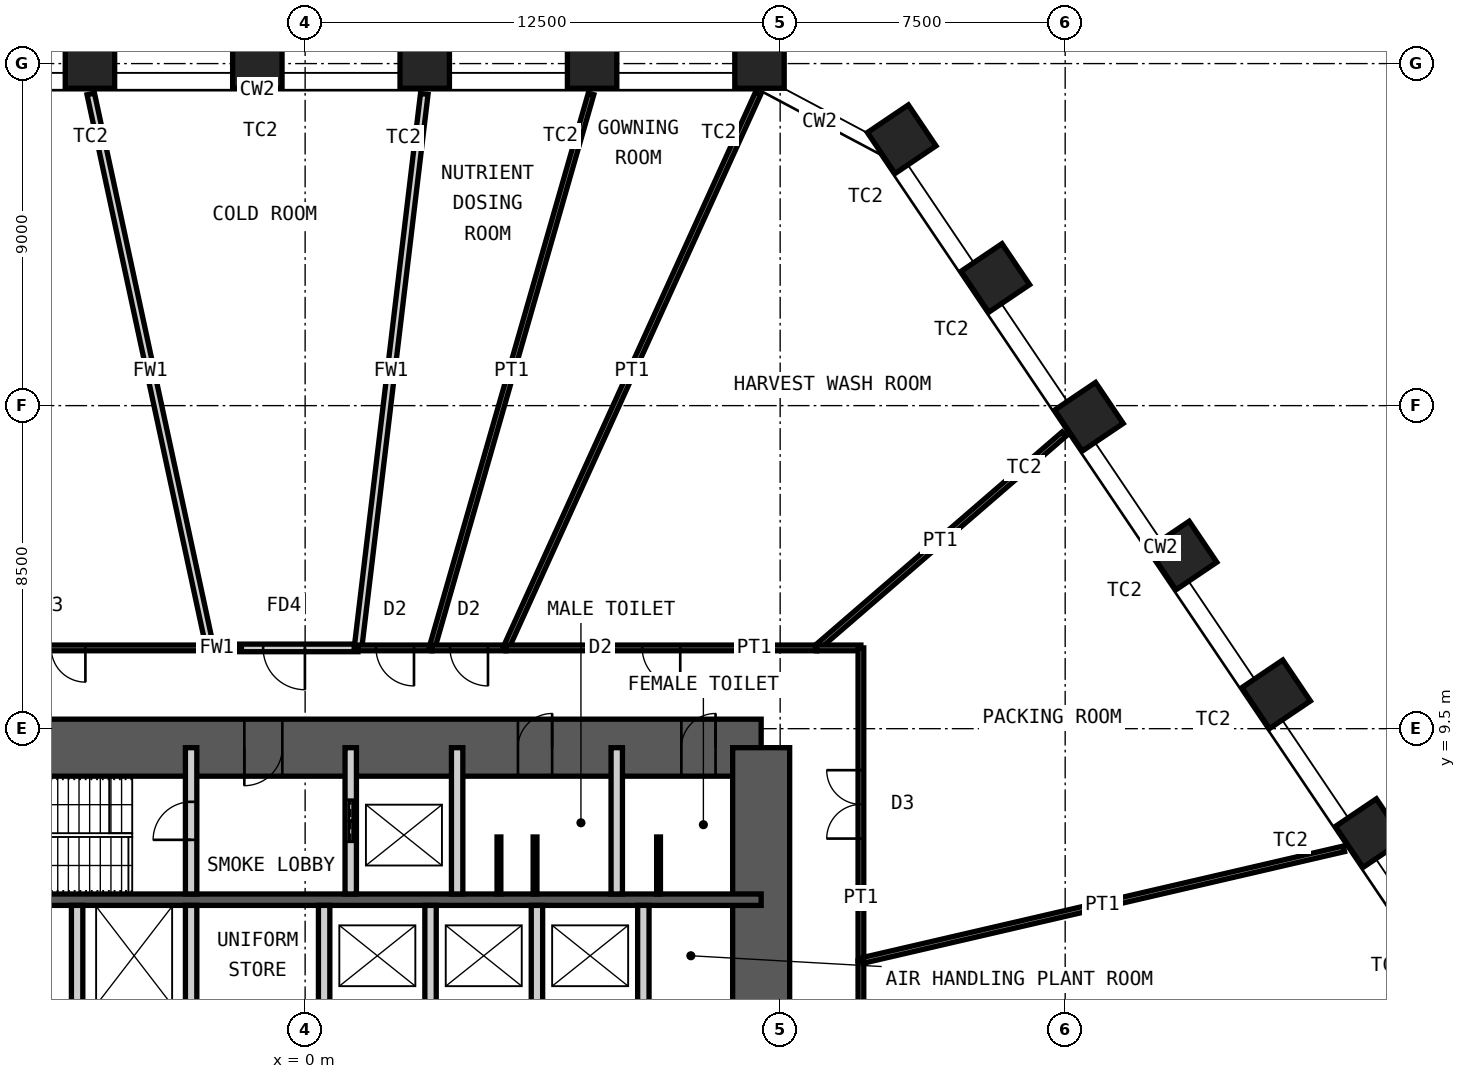
"""IFC4 building model, lengths in metres.
Left out: names, types, materials, properties, quantities, classifications, styles, units other than length and angle.
Written with IfcOpenShell. Run it as: python <this file> out.ifc"""

import sys

from ifc_helpers import new_model, si_unit, direction, frame, frame_2d, origin, origin_2d, place, context, subcontext, project, spatial, rectangle, hollow_rectangle, extrude, element, fill, save


model = new_model("IFC4")
c1 = context("Model", 3, precision=1e-05, world=origin(), true_north=direction((0.0, 1.0)))
c2 = subcontext(c1, "Body", "Model", "MODEL_VIEW")
j1 = project(units=[si_unit("LENGTHUNIT", "METRE"), si_unit("PLANEANGLEUNIT", "RADIAN")], contexts=[c1])
p1 = place(None, origin())
s1 = spatial("IfcSite", under=j1, at=p1, CompositionType="ELEMENT")
p2 = place(p1, origin())
s2 = spatial("IfcBuilding", under=s1, at=p2, CompositionType="ELEMENT")
p3 = place(p2, frame((0.0, 0.0, 72.0)))
s3 = spatial("IfcBuildingStorey", under=s2, at=p3, CompositionType="ELEMENT", Elevation=72.0)
for number, where, z_axis, x_axis in (
    (1, (-5.662, 27.0, 0.0), (0.0, 0.0, 1.0), (-1.0, 0.0, 0.0)),
    (2, (-1.258, 27.0, 0.0), (0.0, 0.0, 1.0), (-1.0, 0.0, 0.0)),
    (3, (3.147, 27.0, 0.0), (0.0, 0.0, 1.0), (-1.0, 0.0, 0.0)),
    (4, (7.552, 27.0, 0.0), (0.0, 0.0, 1.0), (-1.0, 0.0, 0.0)),
    (5, (11.956, 27.0, 0.0), (0.0, 0.0, 1.0), (-1.0, 0.0, 0.0)),
    (6, (15.698, 25.01, 0.0), (0.0, 0.0, 1.0), (-0.559, 0.829, 0.0)),
    (7, (18.161, 21.359, 0.0), (0.0, 0.0, 1.0), (-0.559, 0.829, 0.0)),
    (8, (20.624, 17.707, 0.0), (0.0, 0.0, 1.0), (-0.559, 0.829, 0.0)),
    (9, (23.087, 14.056, 0.0), (0.0, 0.0, 1.0), (-0.559, 0.829, 0.0)),
    (10, (25.55, 10.404, 0.0), (0.0, 0.0, 1.0), (-0.559, 0.829, 0.0)),
    (11, (28.013, 6.752, 0.0), (0.0, 0.0, 1.0), (-0.559, 0.829, 0.0)),
):
    element("IfcColumn", number, at=place(p3, frame(where, z_axis=z_axis, x_axis=x_axis)), inside=s3, PredefinedType="COLUMN", context=c2, shape_type="SweptSolid", body=[
        extrude(hollow_rectangle(XDim=1.3, YDim=1.3, WallThickness=0.1, at=origin_2d()), origin(), (0.0, 0.0, 1.0), 5.0),
    ])
p4 = place(p3, frame((-12.0, 9.0, 0.0), z_axis=(0.0, 0.0, 1.0), x_axis=(1.0, 0.0, 0.0)))
e12 = element("IfcWall", 12, at=p4, inside=s3, PredefinedType="SHEAR", context=c2, shape_type="SweptSolid", body=[
    extrude(rectangle(XDim=24.0, YDim=1.5, at=frame_2d((12.0, 0.0))), origin(), (0.0, 0.0, 1.0), 5.0),
])
p5 = place(p4, frame((10.4, 0.0, 0.0)))
e13 = element("IfcOpeningElement", 13, at=p5, cuts=e12, PredefinedType="OPENING", context=c2, shape_type="SweptSolid", body=[
    extrude(rectangle(XDim=1.0, YDim=2.1, at=frame_2d((0.5, 1.05))), frame((0.0, 0.76, 0.0), z_axis=(0.0, -1.0, 0.0), x_axis=(1.0, 0.0, 0.0)), (0.0, 0.0, 1.0), 1.52),
])
p6 = place(p4, frame((17.6, 0.0, 0.0)))
e14 = element("IfcOpeningElement", 14, at=p6, cuts=e12, PredefinedType="OPENING", context=c2, shape_type="SweptSolid", body=[
    extrude(rectangle(XDim=0.9, YDim=2.1, at=frame_2d((0.45, 1.05))), frame((0.0, 0.76, 0.0), z_axis=(0.0, -1.0, 0.0), x_axis=(1.0, 0.0, 0.0)), (0.0, 0.0, 1.0), 1.52),
])
p7 = place(p4, frame((21.9, 0.0, 0.0)))
e15 = element("IfcOpeningElement", 15, at=p7, cuts=e12, PredefinedType="OPENING", context=c2, shape_type="SweptSolid", body=[
    extrude(rectangle(XDim=0.9, YDim=2.1, at=frame_2d((0.45, 1.05))), frame((0.0, 0.76, 0.0), z_axis=(0.0, -1.0, 0.0), x_axis=(1.0, 0.0, 0.0)), (0.0, 0.0, 1.0), 1.52),
])
p8 = place(p3, frame((12.0, -9.0, 0.0), z_axis=(0.0, 0.0, 1.0), x_axis=(0.0, 1.0, 0.0)))
e16 = element("IfcWall", 16, at=p8, inside=s3, PredefinedType="SHEAR", context=c2, shape_type="SweptSolid", body=[
    extrude(rectangle(XDim=18.0, YDim=1.5, at=frame_2d((9.0, 0.0))), origin(), (0.0, 0.0, 1.0), 5.0),
])
p9 = place(p8, frame((8.1, 0.0, 0.0)))
e17 = element("IfcOpeningElement", 17, at=p9, cuts=e16, PredefinedType="OPENING", context=c2, shape_type="SweptSolid", body=[
    extrude(rectangle(XDim=1.8, YDim=2.1, at=frame_2d((0.9, 1.05))), frame((0.0, 0.76, 0.0), z_axis=(0.0, -1.0, 0.0), x_axis=(1.0, 0.0, 0.0)), (0.0, 0.0, 1.0), 1.52),
])
p10 = place(p3, frame((-12.0, 5.0, 0.0), z_axis=(0.0, 0.0, 1.0), x_axis=(1.0, 0.0, 0.0)))
e18 = element("IfcWall", 18, at=p10, inside=s3, PredefinedType="SHEAR", context=c2, shape_type="SweptSolid", body=[
    extrude(rectangle(XDim=24.0, YDim=0.3, at=frame_2d((12.0, 0.0))), origin(), (0.0, 0.0, 1.0), 5.0),
])
p11 = place(p3, frame((-3.0, 5.15, 0.0), z_axis=(0.0, 0.0, 1.0), x_axis=(0.0, 1.0, 0.0)))
e19 = element("IfcWall", 19, at=p11, inside=s3, PredefinedType="PARTITIONING", context=c2, shape_type="SweptSolid", body=[
    extrude(rectangle(XDim=3.85, YDim=0.3, at=frame_2d((1.925, 0.0))), origin(), (0.0, 0.0, 1.0), 4.78),
])
p12 = place(p11, frame((1.425, 0.0, 0.0)))
e20 = element("IfcOpeningElement", 20, at=p12, cuts=e19, PredefinedType="OPENING", context=c2, shape_type="SweptSolid", body=[
    extrude(rectangle(XDim=1.0, YDim=2.1, at=frame_2d((0.5, 1.05))), frame((0.0, 0.16, 0.0), z_axis=(0.0, -1.0, 0.0), x_axis=(1.0, 0.0, 0.0)), (0.0, 0.0, 1.0), 0.32),
])
p13 = place(p3, frame((1.2, 5.15, 0.0), z_axis=(0.0, 0.0, 1.0), x_axis=(0.0, 1.0, 0.0)))
e21 = element("IfcWall", 21, at=p13, inside=s3, PredefinedType="PARTITIONING", context=c2, shape_type="SweptSolid", body=[
    extrude(rectangle(XDim=3.85, YDim=0.3, at=frame_2d((1.925, 0.0))), origin(), (0.0, 0.0, 1.0), 4.78),
])
p14 = place(p13, frame((1.375, 0.0, 0.0)))
e22 = element("IfcOpeningElement", 22, at=p14, cuts=e21, PredefinedType="OPENING", context=c2, shape_type="SweptSolid", body=[
    extrude(rectangle(XDim=1.1, YDim=2.4, at=frame_2d((0.55, 1.2))), frame((0.0, 0.16, 0.0), z_axis=(0.0, -1.0, 0.0), x_axis=(1.0, 0.0, 0.0)), (0.0, 0.0, 1.0), 0.32),
])
for number, where, z_axis, x_axis in (
    (23, (4.0, 5.15, 0.0), (0.0, 0.0, 1.0), (0.0, 1.0, 0.0)),
    (24, (8.2, 5.15, 0.0), (0.0, 0.0, 1.0), (0.0, 1.0, 0.0)),
):
    element("IfcWall", number, at=place(p3, frame(where, z_axis=z_axis, x_axis=x_axis)), inside=s3, PredefinedType="PARTITIONING", context=c2, shape_type="SweptSolid", body=[
        extrude(rectangle(XDim=3.85, YDim=0.3, at=frame_2d((1.925, 0.0))), origin(), (0.0, 0.0, 1.0), 4.78),
    ])
for number, where, z_axis, x_axis in (
    (25, (-6.0, 2.2, 0.0), (0.0, 0.0, 1.0), (0.0, 1.0, 0.0)),
    (26, (-3.0, 2.2, 0.0), (0.0, 0.0, 1.0), (0.0, 1.0, 0.0)),
    (27, (0.5, 2.2, 0.0), (0.0, 0.0, 1.0), (0.0, 1.0, 0.0)),
    (28, (3.3, 2.2, 0.0), (0.0, 0.0, 1.0), (0.0, 1.0, 0.0)),
    (29, (6.1, 2.2, 0.0), (0.0, 0.0, 1.0), (0.0, 1.0, 0.0)),
    (30, (8.9, 2.2, 0.0), (0.0, 0.0, 1.0), (0.0, 1.0, 0.0)),
):
    element("IfcWall", number, at=place(p3, frame(where, z_axis=z_axis, x_axis=x_axis)), inside=s3, PredefinedType="PARTITIONING", context=c2, shape_type="SweptSolid", body=[
        extrude(rectangle(XDim=2.65, YDim=0.3, at=frame_2d((1.325, 0.0))), origin(), (0.0, 0.0, 1.0), 4.78),
    ])
for number, where, z_axis, x_axis in (
    (31, (5.1, 5.15, 0.0), (0.0, 0.0, 1.0), (0.0, 1.0, 0.0)),
    (32, (6.05, 5.15, 0.0), (0.0, 0.0, 1.0), (0.0, 1.0, 0.0)),
    (33, (9.3, 5.15, 0.0), (0.0, 0.0, 1.0), (0.0, 1.0, 0.0)),
):
    element("IfcWall", number, at=place(p3, frame(where, z_axis=z_axis, x_axis=x_axis)), inside=s3, PredefinedType="PARTITIONING", context=c2, shape_type="SweptSolid", body=[
        extrude(rectangle(XDim=1.5, YDim=0.1, at=frame_2d((0.75, 0.0))), origin(), (0.0, 0.0, 1.0), 2.1),
    ])
p15 = place(p3, frame((-10.861, 11.625, 0.0), z_axis=(0.0, 0.0, 1.0), x_axis=(1.0, 0.0, 0.0)))
e34 = element("IfcWall", 34, at=p15, inside=s3, PredefinedType="PARTITIONING", context=c2, shape_type="SweptSolid", body=[
    extrude(rectangle(XDim=8.359, YDim=0.15, at=frame_2d((4.179, 0.0))), origin(), (0.0, 0.0, 1.0), 4.8),
])
p16 = place(p15, frame((3.279, 0.0, 0.0)))
e35 = element("IfcOpeningElement", 35, at=p16, cuts=e34, PredefinedType="OPENING", context=c2, shape_type="SweptSolid", body=[
    extrude(rectangle(XDim=1.8, YDim=2.4, at=frame_2d((0.9, 1.2))), frame((0.0, 0.085, 0.0), z_axis=(0.0, -1.0, 0.0), x_axis=(1.0, 0.0, 0.0)), (0.0, 0.0, 1.0), 0.17),
])
p17 = place(p3, frame((-5.641, 26.202, 0.0), z_axis=(0.0, 0.0, 1.0), x_axis=(0.210474950898, -0.977599250738, 0.0)))
e36 = element("IfcWall", 36, at=p17, inside=s3, PredefinedType="PARTITIONING", context=c2, shape_type="SweptSolid", body=[
    extrude(rectangle(XDim=14.911, YDim=0.2, at=frame_2d((7.456, 0.0))), origin(), (0.0, 0.0, 1.0), 3.7),
])
p18 = place(p3, frame((-2.503, 11.625, 0.0), z_axis=(0.0, 0.0, 1.0), x_axis=(1.0, 0.0, 0.0)))
e37 = element("IfcWall", 37, at=p18, inside=s3, PredefinedType="PARTITIONING", context=c2, shape_type="SweptSolid", body=[
    extrude(rectangle(XDim=3.894, YDim=0.2, at=frame_2d((1.947, 0.0))), origin(), (0.0, 0.0, 1.0), 4.8),
])
p19 = place(p18, frame((1.397, 0.0, 0.0)))
e38 = element("IfcOpeningElement", 38, at=p19, cuts=e37, PredefinedType="OPENING", context=c2, shape_type="SweptSolid", body=[
    extrude(rectangle(XDim=1.1, YDim=2.1, at=frame_2d((0.55, 1.05))), frame((0.0, 0.11, 0.0), z_axis=(0.0, -1.0, 0.0), x_axis=(1.0, 0.0, 0.0)), (0.0, 0.0, 1.0), 0.22),
])
p20 = place(p3, frame((3.135, 26.201, 0.0), z_axis=(0.0, 0.0, 1.0), x_axis=(-0.118796980211, -0.992918565388, 0.0)))
e39 = element("IfcWall", 39, at=p20, inside=s3, PredefinedType="PARTITIONING", context=c2, shape_type="SweptSolid", body=[
    extrude(rectangle(XDim=14.68, YDim=0.2, at=frame_2d((7.34, 0.0))), origin(), (0.0, 0.0, 1.0), 3.7),
])
p21 = place(p3, frame((1.391, 11.625, 0.0), z_axis=(0.0, 0.0, 1.0), x_axis=(1.0, 0.0, 0.0)))
e40 = element("IfcWall", 40, at=p21, inside=s3, PredefinedType="PARTITIONING", context=c2, shape_type="SweptSolid", body=[
    extrude(rectangle(XDim=1.947, YDim=0.15, at=frame_2d((0.973, 0.0))), origin(), (0.0, 0.0, 1.0), 4.8),
])
p22 = place(p21, frame((0.473, 0.0, 0.0)))
e41 = element("IfcOpeningElement", 41, at=p22, cuts=e40, PredefinedType="OPENING", context=c2, shape_type="SweptSolid", body=[
    extrude(rectangle(XDim=1.0, YDim=2.4, at=frame_2d((0.5, 1.2))), frame((0.0, 0.085, 0.0), z_axis=(0.0, -1.0, 0.0), x_axis=(1.0, 0.0, 0.0)), (0.0, 0.0, 1.0), 0.17),
])
p23 = place(p3, frame((7.524, 26.204, 0.0), z_axis=(0.0, 0.0, 1.0), x_axis=(-0.275979405656, -0.961163548858, 0.0)))
e42 = element("IfcWall", 42, at=p23, inside=s3, PredefinedType="PARTITIONING", context=c2, shape_type="SweptSolid", body=[
    extrude(rectangle(XDim=15.168, YDim=0.15, at=frame_2d((7.584, 0.0))), origin(), (0.0, 0.0, 1.0), 3.7),
])
p24 = place(p3, frame((3.338, 11.625, 0.0), z_axis=(0.0, 0.0, 1.0), x_axis=(1.0, 0.0, 0.0)))
e43 = element("IfcWall", 43, at=p24, inside=s3, PredefinedType="PARTITIONING", context=c2, shape_type="SweptSolid", body=[
    extrude(rectangle(XDim=1.947, YDim=0.15, at=frame_2d((0.974, 0.0))), origin(), (0.0, 0.0, 1.0), 4.8),
])
p25 = place(p24, frame((0.473, 0.0, 0.0)))
e44 = element("IfcOpeningElement", 44, at=p25, cuts=e43, PredefinedType="OPENING", context=c2, shape_type="SweptSolid", body=[
    extrude(rectangle(XDim=1.0, YDim=2.4, at=frame_2d((0.5, 1.2))), frame((0.0, 0.085, 0.0), z_axis=(0.0, -1.0, 0.0), x_axis=(1.0, 0.0, 0.0)), (0.0, 0.0, 1.0), 0.17),
])
p26 = place(p3, frame((11.915, 26.209, 0.0), z_axis=(0.0, 0.0, 1.0), x_axis=(-0.41384427845, -0.910347688081, 0.0)))
e45 = element("IfcWall", 45, at=p26, inside=s3, PredefinedType="PARTITIONING", context=c2, shape_type="SweptSolid", body=[
    extrude(rectangle(XDim=16.02, YDim=0.15, at=frame_2d((8.01, 0.0))), origin(), (0.0, 0.0, 1.0), 3.7),
])
p27 = place(p3, frame((5.285, 11.625, 0.0), z_axis=(0.0, 0.0, 1.0), x_axis=(1.0, 0.0, 0.0)))
e46 = element("IfcWall", 46, at=p27, inside=s3, PredefinedType="PARTITIONING", context=c2, shape_type="SweptSolid", body=[
    extrude(rectangle(XDim=8.172, YDim=0.15, at=frame_2d((4.086, 0.0))), origin(), (0.0, 0.0, 1.0), 4.8),
])
p28 = place(p27, frame((3.586, 0.0, 0.0)))
e47 = element("IfcOpeningElement", 47, at=p28, cuts=e46, PredefinedType="OPENING", context=c2, shape_type="SweptSolid", body=[
    extrude(rectangle(XDim=1.0, YDim=2.4, at=frame_2d((0.5, 1.2))), frame((0.0, 0.085, 0.0), z_axis=(0.0, -1.0, 0.0), x_axis=(1.0, 0.0, 0.0)), (0.0, 0.0, 1.0), 0.17),
])
p29 = place(p3, frame((19.968, 17.25, 0.0), z_axis=(0.0, 0.0, 1.0), x_axis=(-0.75673751601, -0.65371884772, 0.0)))
e48 = element("IfcWall", 48, at=p29, inside=s3, PredefinedType="PARTITIONING", context=c2, shape_type="SweptSolid", body=[
    extrude(rectangle(XDim=8.605, YDim=0.15, at=frame_2d((4.302, 0.0))), origin(), (0.0, 0.0, 1.0), 3.7),
])
p30 = place(p3, frame((13.457, 11.625, 0.0), z_axis=(0.0, 0.0, 1.0), x_axis=(1.0, 0.0, 0.0)))
e49 = element("IfcWall", 49, at=p30, inside=s3, PredefinedType="PARTITIONING", context=c2, shape_type="SweptSolid", body=[
    extrude(rectangle(XDim=1.168, YDim=0.15, at=frame_2d((0.584, 0.0))), origin(), (0.0, 0.0, 1.0), 4.8),
])
p31 = place(p3, frame((14.625, 11.625, 0.0), z_axis=(0.0, 0.0, 1.0), x_axis=(0.0, -1.0, 0.0)))
e50 = element("IfcWall", 50, at=p31, inside=s3, PredefinedType="PARTITIONING", context=c2, shape_type="SweptSolid", body=[
    extrude(rectangle(XDim=8.234, YDim=0.15, at=frame_2d((4.117, 0.0))), origin(), (0.0, 0.0, 1.0), 4.8),
])
p32 = place(p31, frame((3.217, 0.0, 0.0)))
e51 = element("IfcOpeningElement", 51, at=p32, cuts=e50, PredefinedType="OPENING", context=c2, shape_type="SweptSolid", body=[
    extrude(rectangle(XDim=1.8, YDim=2.4, at=frame_2d((0.9, 1.2))), frame((0.0, 0.085, 0.0), z_axis=(0.0, -1.0, 0.0), x_axis=(1.0, 0.0, 0.0)), (0.0, 0.0, 1.0), 0.17),
])
p33 = place(p3, frame((27.336, 6.338, 0.0), z_axis=(0.0, 0.0, 1.0), x_axis=(-0.974155090553, -0.225880188486, 0.0)))
e52 = element("IfcWall", 52, at=p33, inside=s3, PredefinedType="PARTITIONING", context=c2, shape_type="SweptSolid", body=[
    extrude(rectangle(XDim=13.048, YDim=0.15, at=frame_2d((6.524, 0.0))), origin(), (0.0, 0.0, 1.0), 3.7),
])
p34 = place(p3, frame((14.625, 3.391, 0.0), z_axis=(0.0, 0.0, 1.0), x_axis=(0.0, -1.0, 0.0)))
e53 = element("IfcWall", 53, at=p34, inside=s3, PredefinedType="PARTITIONING", context=c2, shape_type="SweptSolid", body=[
    extrude(rectangle(XDim=5.722, YDim=0.15, at=frame_2d((2.861, 0.0))), origin(), (0.0, 0.0, 1.0), 4.8),
])
p35 = place(p34, frame((2.361, 0.0, 0.0)))
e54 = element("IfcOpeningElement", 54, at=p35, cuts=e53, PredefinedType="OPENING", context=c2, shape_type="SweptSolid", body=[
    extrude(rectangle(XDim=1.0, YDim=2.4, at=frame_2d((0.5, 1.2))), frame((0.0, 0.085, 0.0), z_axis=(0.0, -1.0, 0.0), x_axis=(1.0, 0.0, 0.0)), (0.0, 0.0, 1.0), 0.17),
])
p36 = place(p5, origin())
e55 = element("IfcDoor", 55, at=p36, inside=s3, OperationType="SINGLE_SWING_LEFT", PredefinedType="DOOR", context=c2, shape_type="SweptSolid", body=[
    extrude(rectangle(XDim=1.0, YDim=2.1, at=frame_2d((0.5, 1.05))), frame((0.0, 0.025, 0.0), z_axis=(0.0, -1.0, 0.0), x_axis=(1.0, 0.0, 0.0)), (0.0, 0.0, 1.0), 0.05),
])
fill(e13, e55)
p37 = place(p6, origin())
e56 = element("IfcDoor", 56, at=p37, inside=s3, OperationType="SINGLE_SWING_LEFT", PredefinedType="DOOR", context=c2, shape_type="SweptSolid", body=[
    extrude(rectangle(XDim=0.9, YDim=2.1, at=frame_2d((0.45, 1.05))), frame((0.0, 0.025, 0.0), z_axis=(0.0, -1.0, 0.0), x_axis=(1.0, 0.0, 0.0)), (0.0, 0.0, 1.0), 0.05),
])
fill(e14, e56)
p38 = place(p7, origin())
e57 = element("IfcDoor", 57, at=p38, inside=s3, OperationType="SINGLE_SWING_LEFT", PredefinedType="DOOR", context=c2, shape_type="SweptSolid", body=[
    extrude(rectangle(XDim=0.9, YDim=2.1, at=frame_2d((0.45, 1.05))), frame((0.0, 0.025, 0.0), z_axis=(0.0, -1.0, 0.0), x_axis=(1.0, 0.0, 0.0)), (0.0, 0.0, 1.0), 0.05),
])
fill(e15, e57)
p39 = place(p12, origin())
e58 = element("IfcDoor", 58, at=p39, inside=s3, OperationType="SINGLE_SWING_RIGHT", PredefinedType="DOOR", context=c2, shape_type="SweptSolid", body=[
    extrude(rectangle(XDim=1.0, YDim=2.1, at=frame_2d((0.5, 1.05))), frame((0.0, 0.025, 0.0), z_axis=(0.0, -1.0, 0.0), x_axis=(1.0, 0.0, 0.0)), (0.0, 0.0, 1.0), 0.05),
])
fill(e20, e58)
p40 = place(p14, origin())
e59 = element("IfcDoor", 59, at=p40, inside=s3, OperationType="DOUBLE_DOOR_SLIDING", PredefinedType="DOOR", context=c2, shape_type="SweptSolid", body=[
    extrude(rectangle(XDim=1.1, YDim=2.4, at=frame_2d((0.55, 1.2))), frame((0.0, 0.025, 0.0), z_axis=(0.0, -1.0, 0.0), x_axis=(1.0, 0.0, 0.0)), (0.0, 0.0, 1.0), 0.05),
])
fill(e22, e59)
p41 = place(p16, origin())
e60 = element("IfcDoor", 60, at=p41, inside=s3, OperationType="DOUBLE_DOOR_DOUBLE_SWING", PredefinedType="DOOR", context=c2, shape_type="SweptSolid", body=[
    extrude(rectangle(XDim=1.8, YDim=2.4, at=frame_2d((0.9, 1.2))), frame((0.0, 0.025, 0.0), z_axis=(0.0, -1.0, 0.0), x_axis=(1.0, 0.0, 0.0)), (0.0, 0.0, 1.0), 0.05),
])
fill(e35, e60)
p42 = place(p19, origin())
e61 = element("IfcDoor", 61, at=p42, inside=s3, OperationType="SINGLE_SWING_RIGHT", PredefinedType="DOOR", context=c2, shape_type="SweptSolid", body=[
    extrude(rectangle(XDim=1.1, YDim=2.1, at=frame_2d((0.55, 1.05))), frame((0.0, 0.025, 0.0), z_axis=(0.0, -1.0, 0.0), x_axis=(1.0, 0.0, 0.0)), (0.0, 0.0, 1.0), 0.05),
])
fill(e38, e61)
p43 = place(p22, origin())
e62 = element("IfcDoor", 62, at=p43, inside=s3, OperationType="SINGLE_SWING_RIGHT", PredefinedType="DOOR", context=c2, shape_type="SweptSolid", body=[
    extrude(rectangle(XDim=1.0, YDim=2.4, at=frame_2d((0.5, 1.2))), frame((0.0, 0.025, 0.0), z_axis=(0.0, -1.0, 0.0), x_axis=(1.0, 0.0, 0.0)), (0.0, 0.0, 1.0), 0.05),
])
fill(e41, e62)
p44 = place(p25, origin())
e63 = element("IfcDoor", 63, at=p44, inside=s3, OperationType="SINGLE_SWING_RIGHT", PredefinedType="DOOR", context=c2, shape_type="SweptSolid", body=[
    extrude(rectangle(XDim=1.0, YDim=2.4, at=frame_2d((0.5, 1.2))), frame((0.0, 0.025, 0.0), z_axis=(0.0, -1.0, 0.0), x_axis=(1.0, 0.0, 0.0)), (0.0, 0.0, 1.0), 0.05),
])
fill(e44, e63)
p45 = place(p28, origin())
e64 = element("IfcDoor", 64, at=p45, inside=s3, OperationType="SINGLE_SWING_RIGHT", PredefinedType="DOOR", context=c2, shape_type="SweptSolid", body=[
    extrude(rectangle(XDim=1.0, YDim=2.4, at=frame_2d((0.5, 1.2))), frame((0.0, 0.025, 0.0), z_axis=(0.0, -1.0, 0.0), x_axis=(1.0, 0.0, 0.0)), (0.0, 0.0, 1.0), 0.05),
])
fill(e47, e64)
p46 = place(p32, origin())
e65 = element("IfcDoor", 65, at=p46, inside=s3, OperationType="DOUBLE_DOOR_DOUBLE_SWING", PredefinedType="DOOR", context=c2, shape_type="SweptSolid", body=[
    extrude(rectangle(XDim=1.8, YDim=2.4, at=frame_2d((0.9, 1.2))), frame((0.0, 0.025, 0.0), z_axis=(0.0, -1.0, 0.0), x_axis=(1.0, 0.0, 0.0)), (0.0, 0.0, 1.0), 0.05),
])
fill(e51, e65)
save(model, sys.argv[1])
